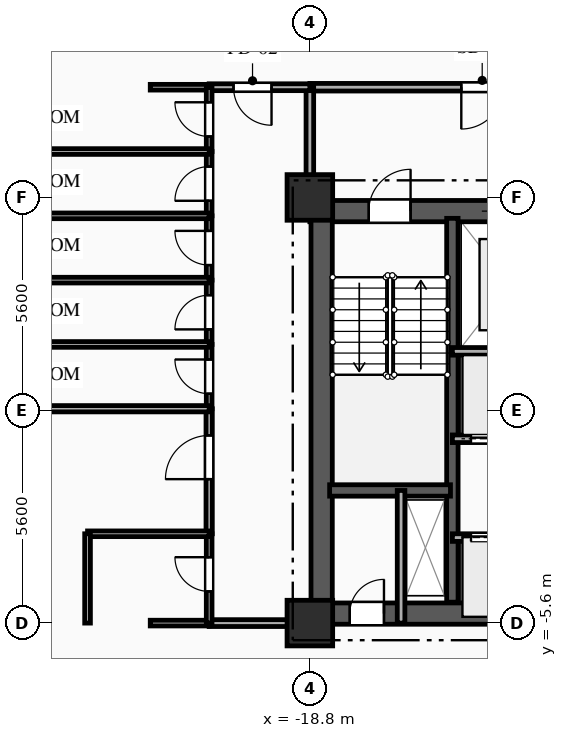
"""IFC4 building model, lengths in metres.
Left out: names, types, materials, properties, quantities, classifications, styles, units other than length and angle.
Written with IfcOpenShell. Run it as: python <this file> out.ifc"""

import sys

from ifc_helpers import new_model, si_unit, direction, frame, frame_2d, origin, origin_2d, place, context, subcontext, project, spatial, rectangle, extrude, element, fill, save


model = new_model("IFC4")
c1 = context("Model", 3, precision=1e-05, world=origin(), true_north=direction((0.0, 1.0)))
c2 = subcontext(c1, "Body", "Model", "MODEL_VIEW")
j1 = project(units=[si_unit("LENGTHUNIT", "METRE"), si_unit("PLANEANGLEUNIT", "RADIAN")], contexts=[c1])
p1 = place(None, origin())
s1 = spatial("IfcSite", under=j1, at=p1, CompositionType="ELEMENT")
p2 = place(p1, origin())
s2 = spatial("IfcBuilding", under=s1, at=p2, CompositionType="ELEMENT")
p3 = place(p2, frame((0.0, 0.0, 53.8)))
s3 = spatial("IfcBuildingStorey", under=s2, at=p3, CompositionType="ELEMENT", Elevation=53.8)
for number, where, z_axis, x_axis in (
    (1, (-18.8, -5.6, 0.0), (0.0, 0.0, 1.0), (1.0, 0.0, 0.0)),
    (2, (-18.8, 5.6, 0.0), (0.0, 0.0, 1.0), (1.0, 0.0, 0.0)),
):
    element("IfcColumn", number, at=place(p3, frame(where, z_axis=z_axis, x_axis=x_axis)), inside=s3, PredefinedType="COLUMN", context=c2, shape_type="SweptSolid", body=[
        extrude(rectangle(XDim=1.2, YDim=1.2, at=origin_2d()), origin(), (0.0, 0.0, 1.0), 3.35),
    ])
p4 = place(p3, frame((-18.8, 5.24, 0.0), z_axis=(0.0, 0.0, 1.0), x_axis=(1.0, 0.0, 0.0)))
e3 = element("IfcWall", 3, at=p4, inside=s3, PredefinedType="SHEAR", context=c2, shape_type="SweptSolid", body=[
    extrude(rectangle(XDim=9.6, YDim=0.56, at=frame_2d((4.8, 0.0))), origin(), (0.0, 0.0, 1.0), 3.035),
])
p5 = place(p4, frame((1.55, 0.0, 0.0)))
e4 = element("IfcOpeningElement", 4, at=p5, cuts=e3, PredefinedType="OPENING", context=c2, shape_type="SweptSolid", body=[
    extrude(rectangle(XDim=1.1, YDim=2.15, at=frame_2d((0.55, 1.075))), frame((0.0, 0.29, 0.0), z_axis=(0.0, -1.0, 0.0), x_axis=(1.0, 0.0, 0.0)), (0.0, 0.0, 1.0), 0.58),
])
p6 = place(p4, frame((4.775, 0.0, 0.0)))
e5 = element("IfcOpeningElement", 5, at=p6, cuts=e3, PredefinedType="OPENING", context=c2, shape_type="SweptSolid", body=[
    extrude(rectangle(XDim=1.05, YDim=2.1, at=frame_2d((0.525, 1.05))), frame((0.0, 0.29, 0.0), z_axis=(0.0, -1.0, 0.0), x_axis=(1.0, 0.0, 0.0)), (0.0, 0.0, 1.0), 0.58),
])
p7 = place(p3, frame((-18.8, -5.35, 0.0), z_axis=(0.0, 0.0, 1.0), x_axis=(1.0, 0.0, 0.0)))
e6 = element("IfcWall", 6, at=p7, inside=s3, PredefinedType="SHEAR", context=c2, shape_type="SweptSolid", body=[
    extrude(rectangle(XDim=9.6, YDim=0.56, at=frame_2d((4.8, 0.0))), origin(), (0.0, 0.0, 1.0), 3.035),
])
p8 = place(p7, frame((1.05, 0.0, 0.0)))
e7 = element("IfcOpeningElement", 7, at=p8, cuts=e6, PredefinedType="OPENING", context=c2, shape_type="SweptSolid", body=[
    extrude(rectangle(XDim=0.9, YDim=2.1, at=frame_2d((0.45, 1.05))), frame((0.0, 0.29, 0.0), z_axis=(0.0, -1.0, 0.0), x_axis=(1.0, 0.0, 0.0)), (0.0, 0.0, 1.0), 0.58),
])
p9 = place(p3, frame((-18.49, -5.05, 0.0), z_axis=(0.0, 0.0, 1.0), x_axis=(0.0, 1.0, 0.0)))
e8 = element("IfcWall", 8, at=p9, inside=s3, PredefinedType="SHEAR", context=c2, shape_type="SweptSolid", body=[
    extrude(rectangle(XDim=10.1, YDim=0.56, at=frame_2d((5.05, 0.0))), origin(), (0.0, 0.0, 1.0), 3.035),
])
p10 = place(p3, frame((-15.05, -5.05, 0.0), z_axis=(0.0, 0.0, 1.0), x_axis=(0.0, 1.0, 0.0)))
e9 = element("IfcWall", 9, at=p10, inside=s3, PredefinedType="SHEAR", context=c2, shape_type="SweptSolid", body=[
    extrude(rectangle(XDim=10.1, YDim=0.3, at=frame_2d((5.05, 0.0))), origin(), (0.0, 0.0, 1.0), 3.035),
])
p11 = place(p3, frame((-18.28, -2.11, 0.0), z_axis=(0.0, 0.0, 1.0), x_axis=(1.0, 0.0, 0.0)))
e10 = element("IfcWall", 10, at=p11, inside=s3, PredefinedType="SHEAR", context=c2, shape_type="SweptSolid", body=[
    extrude(rectangle(XDim=3.18, YDim=0.3, at=frame_2d((1.59, 0.0))), origin(), (0.0, 0.0, 1.0), 3.035),
])
p12 = place(p3, frame((-16.4, -5.6, 0.0), z_axis=(0.0, 0.0, 1.0), x_axis=(0.0, 1.0, 0.0)))
e11 = element("IfcWall", 11, at=p12, inside=s3, PredefinedType="PARTITIONING", context=c2, shape_type="SweptSolid", body=[
    extrude(rectangle(XDim=3.49, YDim=0.2, at=frame_2d((1.745, 0.0))), origin(), (0.0, 0.0, 1.0), 3.035),
])
p13 = place(p3, frame((-12.0, 8.5, 0.0), z_axis=(0.0, 0.0, 1.0), x_axis=(-1.0, 0.0, 0.0)))
e12 = element("IfcWall", 12, at=p13, inside=s3, PredefinedType="PARTITIONING", context=c2, shape_type="SweptSolid", body=[
    extrude(rectangle(XDim=6.8, YDim=0.2, at=frame_2d((3.4, 0.0))), origin(), (0.0, 0.0, 1.0), 3.035),
])
p14 = place(p13, frame((1.715, 0.0, 0.0)))
e13 = element("IfcOpeningElement", 13, at=p14, cuts=e12, PredefinedType="OPENING", context=c2, shape_type="SweptSolid", body=[
    extrude(rectangle(XDim=1.1, YDim=2.15, at=frame_2d((0.55, 1.075))), frame((0.0, 0.11, 0.0), z_axis=(0.0, -1.0, 0.0), x_axis=(1.0, 0.0, 0.0)), (0.0, 0.0, 1.0), 0.22),
])
p15 = place(p3, frame((-18.8, 8.5, 0.0), z_axis=(0.0, 0.0, 1.0), x_axis=(0.0, -1.0, 0.0)))
e14 = element("IfcWall", 14, at=p15, inside=s3, PredefinedType="PARTITIONING", context=c2, shape_type="SweptSolid", body=[
    extrude(rectangle(XDim=2.9, YDim=0.2, at=frame_2d((1.45, 0.0))), origin(), (0.0, 0.0, 1.0), 2.52),
])
p16 = place(p3, frame((-15.05, -3.35, 0.0), z_axis=(0.0, 0.0, 1.0), x_axis=(1.0, 0.0, 0.0)))
e15 = element("IfcWall", 15, at=p16, inside=s3, PredefinedType="PARTITIONING", context=c2, shape_type="SweptSolid", body=[
    extrude(rectangle(XDim=2.03, YDim=0.2, at=frame_2d((1.015, 0.0))), origin(), (0.0, 0.0, 1.0), 3.035),
])
p17 = place(p16, frame((0.49, 0.0, 0.0)))
e16 = element("IfcOpeningElement", 16, at=p17, cuts=e15, PredefinedType="OPENING", context=c2, shape_type="SweptSolid", body=[
    extrude(rectangle(XDim=1.05, YDim=2.1, at=frame_2d((0.525, 1.05))), frame((0.0, 0.11, 0.0), z_axis=(0.0, -1.0, 0.0), x_axis=(1.0, 0.0, 0.0)), (0.0, 0.0, 1.0), 0.22),
])
p18 = place(p3, frame((-13.02, -0.75, 0.0), z_axis=(0.0, 0.0, 1.0), x_axis=(-1.0, 0.0, 0.0)))
e17 = element("IfcWall", 17, at=p18, inside=s3, PredefinedType="PARTITIONING", context=c2, shape_type="SweptSolid", body=[
    extrude(rectangle(XDim=2.03, YDim=0.2, at=frame_2d((1.015, 0.0))), origin(), (0.0, 0.0, 1.0), 3.035),
])
p19 = place(p18, frame((0.49, 0.0, 0.0)))
e18 = element("IfcOpeningElement", 18, at=p19, cuts=e17, PredefinedType="OPENING", context=c2, shape_type="SweptSolid", body=[
    extrude(rectangle(XDim=1.05, YDim=2.1, at=frame_2d((0.525, 1.05))), frame((0.0, 0.11, 0.0), z_axis=(0.0, -1.0, 0.0), x_axis=(1.0, 0.0, 0.0)), (0.0, 0.0, 1.0), 0.22),
])
p20 = place(p3, frame((-18.8, 8.5, 0.0), z_axis=(0.0, 0.0, 1.0), x_axis=(-1.0, 0.0, 0.0)))
e19 = element("IfcWall", 19, at=p20, inside=s3, PredefinedType="PARTITIONING", context=c2, shape_type="SweptSolid", body=[
    extrude(rectangle(XDim=2.65, YDim=0.18, at=frame_2d((1.325, 0.0))), origin(), (0.0, 0.0, 1.0), 3.035),
])
p21 = place(p20, frame((1.009, 0.0, 0.0)))
e20 = element("IfcOpeningElement", 20, at=p21, cuts=e19, PredefinedType="OPENING", context=c2, shape_type="SweptSolid", body=[
    extrude(rectangle(XDim=1.0, YDim=2.15, at=frame_2d((0.5, 1.075))), frame((0.0, 0.1, 0.0), z_axis=(0.0, -1.0, 0.0), x_axis=(1.0, 0.0, 0.0)), (0.0, 0.0, 1.0), 0.2),
])
p22 = place(p3, frame((-21.45, 8.5, 0.0), z_axis=(0.0, 0.0, 1.0), x_axis=(-1.0, 0.0, 0.0)))
e21 = element("IfcWall", 21, at=p22, inside=s3, PredefinedType="PARTITIONING", context=c2, shape_type="SweptSolid", body=[
    extrude(rectangle(XDim=1.55, YDim=0.15, at=frame_2d((0.775, 0.0))), origin(), (0.0, 0.0, 1.0), 3.035),
])
p23 = place(p3, frame((-21.45, -5.6, 0.0), z_axis=(0.0, 0.0, 1.0), x_axis=(1.0, 0.0, 0.0)))
e22 = element("IfcWall", 22, at=p23, inside=s3, PredefinedType="PARTITIONING", context=c2, shape_type="SweptSolid", body=[
    extrude(rectangle(XDim=2.65, YDim=0.18, at=frame_2d((1.325, 0.0))), origin(), (0.0, 0.0, 1.0), 3.035),
])
p24 = place(p3, frame((-23.0, -5.6, 0.0), z_axis=(0.0, 0.0, 1.0), x_axis=(1.0, 0.0, 0.0)))
e23 = element("IfcWall", 23, at=p24, inside=s3, PredefinedType="PLUMBINGWALL", context=c2, shape_type="SweptSolid", body=[
    extrude(rectangle(XDim=1.55, YDim=0.15, at=frame_2d((0.775, 0.0))), origin(), (0.0, 0.0, 1.0), 3.035),
])
p25 = place(p3, frame((-21.45, -5.6, 0.0), z_axis=(0.0, 0.0, 1.0), x_axis=(0.0, 1.0, 0.0)))
e24 = element("IfcWall", 24, at=p25, inside=s3, PredefinedType="PLUMBINGWALL", context=c2, shape_type="SweptSolid", body=[
    extrude(rectangle(XDim=2.35, YDim=0.15, at=frame_2d((1.175, 0.0))), origin(), (0.0, 0.0, 1.0), 3.035),
])
p26 = place(p25, frame((0.834, 0.0, 0.0)))
e25 = element("IfcOpeningElement", 25, at=p26, cuts=e24, PredefinedType="OPENING", context=c2, shape_type="SweptSolid", body=[
    extrude(rectangle(XDim=0.9, YDim=2.1, at=frame_2d((0.45, 1.05))), frame((0.0, 0.085, 0.0), z_axis=(0.0, -1.0, 0.0), x_axis=(1.0, 0.0, 0.0)), (0.0, 0.0, 1.0), 0.17),
])
p27 = place(p3, frame((-21.45, -3.25, 0.0), z_axis=(0.0, 0.0, 1.0), x_axis=(0.0, 1.0, 0.0)))
e26 = element("IfcWall", 26, at=p27, inside=s3, PredefinedType="PARTITIONING", context=c2, shape_type="SweptSolid", body=[
    extrude(rectangle(XDim=3.29, YDim=0.165, at=frame_2d((1.645, 0.0))), origin(), (0.0, 0.0, 1.0), 3.035),
])
p28 = place(p27, frame((1.438, 0.0, 0.0)))
e27 = element("IfcOpeningElement", 27, at=p28, cuts=e26, PredefinedType="OPENING", context=c2, shape_type="SweptSolid", body=[
    extrude(rectangle(XDim=1.15, YDim=2.15, at=frame_2d((0.575, 1.075))), frame((0.0, 0.093, 0.0), z_axis=(0.0, -1.0, 0.0), x_axis=(1.0, 0.0, 0.0)), (0.0, 0.0, 1.0), 0.185),
])
p29 = place(p3, frame((-21.45, 0.04, 0.0), z_axis=(0.0, 0.0, 1.0), x_axis=(0.0, 1.0, 0.0)))
e28 = element("IfcWall", 28, at=p29, inside=s3, PredefinedType="PARTITIONING", context=c2, shape_type="SweptSolid", body=[
    extrude(rectangle(XDim=1.692, YDim=0.15, at=frame_2d((0.846, 0.0))), origin(), (0.0, 0.0, 1.0), 3.035),
])
p30 = place(p29, frame((0.396, 0.0, 0.0)))
e29 = element("IfcOpeningElement", 29, at=p30, cuts=e28, PredefinedType="OPENING", context=c2, shape_type="SweptSolid", body=[
    extrude(rectangle(XDim=0.9, YDim=2.1, at=frame_2d((0.45, 1.05))), frame((0.0, 0.085, 0.0), z_axis=(0.0, -1.0, 0.0), x_axis=(1.0, 0.0, 0.0)), (0.0, 0.0, 1.0), 0.17),
])
p31 = place(p3, frame((-21.45, 1.732, 0.0), z_axis=(0.0, 0.0, 1.0), x_axis=(0.0, 1.0, 0.0)))
e30 = element("IfcWall", 30, at=p31, inside=s3, PredefinedType="PARTITIONING", context=c2, shape_type="SweptSolid", body=[
    extrude(rectangle(XDim=1.692, YDim=0.15, at=frame_2d((0.846, 0.0))), origin(), (0.0, 0.0, 1.0), 3.035),
])
p32 = place(p31, frame((0.396, 0.0, 0.0)))
e31 = element("IfcOpeningElement", 31, at=p32, cuts=e30, PredefinedType="OPENING", context=c2, shape_type="SweptSolid", body=[
    extrude(rectangle(XDim=0.9, YDim=2.1, at=frame_2d((0.45, 1.05))), frame((0.0, 0.085, 0.0), z_axis=(0.0, -1.0, 0.0), x_axis=(1.0, 0.0, 0.0)), (0.0, 0.0, 1.0), 0.17),
])
p33 = place(p3, frame((-21.45, 3.424, 0.0), z_axis=(0.0, 0.0, 1.0), x_axis=(0.0, 1.0, 0.0)))
e32 = element("IfcWall", 32, at=p33, inside=s3, PredefinedType="PARTITIONING", context=c2, shape_type="SweptSolid", body=[
    extrude(rectangle(XDim=1.692, YDim=0.15, at=frame_2d((0.846, 0.0))), origin(), (0.0, 0.0, 1.0), 3.035),
])
p34 = place(p33, frame((0.396, 0.0, 0.0)))
e33 = element("IfcOpeningElement", 33, at=p34, cuts=e32, PredefinedType="OPENING", context=c2, shape_type="SweptSolid", body=[
    extrude(rectangle(XDim=0.9, YDim=2.1, at=frame_2d((0.45, 1.05))), frame((0.0, 0.085, 0.0), z_axis=(0.0, -1.0, 0.0), x_axis=(1.0, 0.0, 0.0)), (0.0, 0.0, 1.0), 0.17),
])
p35 = place(p3, frame((-21.45, 5.116, 0.0), z_axis=(0.0, 0.0, 1.0), x_axis=(0.0, 1.0, 0.0)))
e34 = element("IfcWall", 34, at=p35, inside=s3, PredefinedType="PARTITIONING", context=c2, shape_type="SweptSolid", body=[
    extrude(rectangle(XDim=1.692, YDim=0.15, at=frame_2d((0.846, 0.0))), origin(), (0.0, 0.0, 1.0), 3.035),
])
p36 = place(p35, frame((0.396, 0.0, 0.0)))
e35 = element("IfcOpeningElement", 35, at=p36, cuts=e34, PredefinedType="OPENING", context=c2, shape_type="SweptSolid", body=[
    extrude(rectangle(XDim=0.9, YDim=2.1, at=frame_2d((0.45, 1.05))), frame((0.0, 0.085, 0.0), z_axis=(0.0, -1.0, 0.0), x_axis=(1.0, 0.0, 0.0)), (0.0, 0.0, 1.0), 0.17),
])
p37 = place(p3, frame((-21.45, 6.808, 0.0), z_axis=(0.0, 0.0, 1.0), x_axis=(0.0, 1.0, 0.0)))
e36 = element("IfcWall", 36, at=p37, inside=s3, PredefinedType="PARTITIONING", context=c2, shape_type="SweptSolid", body=[
    extrude(rectangle(XDim=1.692, YDim=0.15, at=frame_2d((0.846, 0.0))), origin(), (0.0, 0.0, 1.0), 3.035),
])
p38 = place(p37, frame((0.396, 0.0, 0.0)))
e37 = element("IfcOpeningElement", 37, at=p38, cuts=e36, PredefinedType="OPENING", context=c2, shape_type="SweptSolid", body=[
    extrude(rectangle(XDim=0.9, YDim=2.1, at=frame_2d((0.45, 1.05))), frame((0.0, 0.085, 0.0), z_axis=(0.0, -1.0, 0.0), x_axis=(1.0, 0.0, 0.0)), (0.0, 0.0, 1.0), 0.17),
])
p39 = place(p3, frame((-24.65, -3.25, 0.0), z_axis=(0.0, 0.0, 1.0), x_axis=(1.0, 0.0, 0.0)))
e38 = element("IfcWall", 38, at=p39, inside=s3, PredefinedType="PLUMBINGWALL", context=c2, shape_type="SweptSolid", body=[
    extrude(rectangle(XDim=3.2, YDim=0.15, at=frame_2d((1.6, 0.0))), origin(), (0.0, 0.0, 1.0), 2.52),
])
p40 = place(p3, frame((-24.65, -5.6, 0.0), z_axis=(0.0, 0.0, 1.0), x_axis=(0.0, 1.0, 0.0)))
e39 = element("IfcWall", 39, at=p40, inside=s3, PredefinedType="PLUMBINGWALL", context=c2, shape_type="SweptSolid", body=[
    extrude(rectangle(XDim=2.35, YDim=0.15, at=frame_2d((1.175, 0.0))), origin(), (0.0, 0.0, 1.0), 3.035),
])
p41 = place(p3, frame((-32.8, 0.04, 0.0), z_axis=(0.0, 0.0, 1.0), x_axis=(1.0, 0.0, 0.0)))
e40 = element("IfcWall", 40, at=p41, inside=s3, PredefinedType="PARTITIONING", context=c2, shape_type="SweptSolid", body=[
    extrude(rectangle(XDim=11.35, YDim=0.165, at=frame_2d((5.675, 0.0))), origin(), (0.0, 0.0, 1.0), 3.035),
])
p42 = place(p3, frame((-32.8, 1.732, 0.0), z_axis=(0.0, 0.0, 1.0), x_axis=(1.0, 0.0, 0.0)))
e41 = element("IfcWall", 41, at=p42, inside=s3, PredefinedType="PARTITIONING", context=c2, shape_type="SweptSolid", body=[
    extrude(rectangle(XDim=11.35, YDim=0.15, at=frame_2d((5.675, 0.0))), origin(), (0.0, 0.0, 1.0), 3.035),
])
for number, where, z_axis, x_axis in (
    (42, (-32.8, 3.424, 0.0), (0.0, 0.0, 1.0), (1.0, 0.0, 0.0)),
    (43, (-32.8, 5.116, 0.0), (0.0, 0.0, 1.0), (1.0, 0.0, 0.0)),
):
    element("IfcWall", number, at=place(p3, frame(where, z_axis=z_axis, x_axis=x_axis)), inside=s3, PredefinedType="PARTITIONING", context=c2, shape_type="SweptSolid", body=[
        extrude(rectangle(XDim=11.35, YDim=0.15, at=frame_2d((5.675, 0.0))), origin(), (0.0, 0.0, 1.0), 2.52),
    ])
p43 = place(p3, frame((-32.8, 6.808, 0.0), z_axis=(0.0, 0.0, 1.0), x_axis=(1.0, 0.0, 0.0)))
e44 = element("IfcWall", 44, at=p43, inside=s3, PredefinedType="PARTITIONING", context=c2, shape_type="SweptSolid", body=[
    extrude(rectangle(XDim=11.35, YDim=0.15, at=frame_2d((5.675, 0.0))), origin(), (0.0, 0.0, 1.0), 3.035),
])
p44 = place(p3, frame((-15.05, 1.55, 0.0), z_axis=(0.0, 0.0, 1.0), x_axis=(1.0, 0.0, 0.0)))
e45 = element("IfcWall", 45, at=p44, inside=s3, PredefinedType="PARTITIONING", context=c2, shape_type="SweptSolid", body=[
    extrude(rectangle(XDim=5.85, YDim=0.2, at=frame_2d((2.925, 0.0))), origin(), (0.0, 0.0, 1.0), 3.035),
])
p45 = place(p5, origin())
e46 = element("IfcDoor", 46, at=p45, inside=s3, OperationType="SINGLE_SWING_RIGHT", PredefinedType="DOOR", context=c2, shape_type="SweptSolid", body=[
    extrude(rectangle(XDim=1.1, YDim=2.15, at=frame_2d((0.55, 1.075))), frame((0.0, 0.025, 0.0), z_axis=(0.0, -1.0, 0.0), x_axis=(1.0, 0.0, 0.0)), (0.0, 0.0, 1.0), 0.05),
])
fill(e4, e46)
p46 = place(p8, origin())
e47 = element("IfcDoor", 47, at=p46, inside=s3, OperationType="SINGLE_SWING_RIGHT", PredefinedType="DOOR", context=c2, shape_type="SweptSolid", body=[
    extrude(rectangle(XDim=0.9, YDim=2.1, at=frame_2d((0.45, 1.05))), frame((0.0, 0.025, 0.0), z_axis=(0.0, -1.0, 0.0), x_axis=(1.0, 0.0, 0.0)), (0.0, 0.0, 1.0), 0.05),
])
fill(e7, e47)
p47 = place(p14, origin())
e48 = element("IfcDoor", 48, at=p47, inside=s3, OperationType="SINGLE_SWING_RIGHT", PredefinedType="DOOR", context=c2, shape_type="SweptSolid", body=[
    extrude(rectangle(XDim=1.1, YDim=2.15, at=frame_2d((0.55, 1.075))), frame((0.0, 0.025, 0.0), z_axis=(0.0, -1.0, 0.0), x_axis=(1.0, 0.0, 0.0)), (0.0, 0.0, 1.0), 0.05),
])
fill(e13, e48)
p48 = place(p17, origin())
e49 = element("IfcDoor", 49, at=p48, inside=s3, OperationType="DOUBLE_DOOR_SLIDING", PredefinedType="DOOR", context=c2, shape_type="SweptSolid", body=[
    extrude(rectangle(XDim=1.05, YDim=2.1, at=frame_2d((0.525, 1.05))), frame((0.0, 0.025, 0.0), z_axis=(0.0, -1.0, 0.0), x_axis=(1.0, 0.0, 0.0)), (0.0, 0.0, 1.0), 0.05),
])
fill(e16, e49)
p49 = place(p19, origin())
e50 = element("IfcDoor", 50, at=p49, inside=s3, OperationType="DOUBLE_DOOR_SLIDING", PredefinedType="DOOR", context=c2, shape_type="SweptSolid", body=[
    extrude(rectangle(XDim=1.05, YDim=2.1, at=frame_2d((0.525, 1.05))), frame((0.0, 0.025, 0.0), z_axis=(0.0, -1.0, 0.0), x_axis=(1.0, 0.0, 0.0)), (0.0, 0.0, 1.0), 0.05),
])
fill(e18, e50)
p50 = place(p21, origin())
e51 = element("IfcDoor", 51, at=p50, inside=s3, OperationType="SINGLE_SWING_LEFT", PredefinedType="DOOR", context=c2, shape_type="SweptSolid", body=[
    extrude(rectangle(XDim=1.0, YDim=2.15, at=frame_2d((0.5, 1.075))), frame((0.0, 0.025, 0.0), z_axis=(0.0, -1.0, 0.0), x_axis=(1.0, 0.0, 0.0)), (0.0, 0.0, 1.0), 0.05),
])
fill(e20, e51)
p51 = place(p26, origin())
e52 = element("IfcDoor", 52, at=p51, inside=s3, OperationType="SINGLE_SWING_RIGHT", PredefinedType="DOOR", context=c2, shape_type="SweptSolid", body=[
    extrude(rectangle(XDim=0.9, YDim=2.1, at=frame_2d((0.45, 1.05))), frame((0.0, 0.025, 0.0), z_axis=(0.0, -1.0, 0.0), x_axis=(1.0, 0.0, 0.0)), (0.0, 0.0, 1.0), 0.05),
])
fill(e25, e52)
p52 = place(p28, origin())
e53 = element("IfcDoor", 53, at=p52, inside=s3, OperationType="SINGLE_SWING_LEFT", PredefinedType="DOOR", context=c2, shape_type="SweptSolid", body=[
    extrude(rectangle(XDim=1.15, YDim=2.15, at=frame_2d((0.575, 1.075))), frame((0.0, 0.025, 0.0), z_axis=(0.0, -1.0, 0.0), x_axis=(1.0, 0.0, 0.0)), (0.0, 0.0, 1.0), 0.05),
])
fill(e27, e53)
p53 = place(p30, origin())
e54 = element("IfcDoor", 54, at=p53, inside=s3, OperationType="SINGLE_SWING_RIGHT", PredefinedType="DOOR", context=c2, shape_type="SweptSolid", body=[
    extrude(rectangle(XDim=0.9, YDim=2.1, at=frame_2d((0.45, 1.05))), frame((0.0, 0.025, 0.0), z_axis=(0.0, -1.0, 0.0), x_axis=(1.0, 0.0, 0.0)), (0.0, 0.0, 1.0), 0.05),
])
fill(e29, e54)
p54 = place(p32, origin())
e55 = element("IfcDoor", 55, at=p54, inside=s3, OperationType="SINGLE_SWING_LEFT", PredefinedType="DOOR", context=c2, shape_type="SweptSolid", body=[
    extrude(rectangle(XDim=0.9, YDim=2.1, at=frame_2d((0.45, 1.05))), frame((0.0, 0.025, 0.0), z_axis=(0.0, -1.0, 0.0), x_axis=(1.0, 0.0, 0.0)), (0.0, 0.0, 1.0), 0.05),
])
fill(e31, e55)
p55 = place(p34, origin())
e56 = element("IfcDoor", 56, at=p55, inside=s3, OperationType="SINGLE_SWING_RIGHT", PredefinedType="DOOR", context=c2, shape_type="SweptSolid", body=[
    extrude(rectangle(XDim=0.9, YDim=2.1, at=frame_2d((0.45, 1.05))), frame((0.0, 0.025, 0.0), z_axis=(0.0, -1.0, 0.0), x_axis=(1.0, 0.0, 0.0)), (0.0, 0.0, 1.0), 0.05),
])
fill(e33, e56)
p56 = place(p36, origin())
e57 = element("IfcDoor", 57, at=p56, inside=s3, OperationType="SINGLE_SWING_LEFT", PredefinedType="DOOR", context=c2, shape_type="SweptSolid", body=[
    extrude(rectangle(XDim=0.9, YDim=2.1, at=frame_2d((0.45, 1.05))), frame((0.0, 0.025, 0.0), z_axis=(0.0, -1.0, 0.0), x_axis=(1.0, 0.0, 0.0)), (0.0, 0.0, 1.0), 0.05),
])
fill(e35, e57)
p57 = place(p38, origin())
e58 = element("IfcDoor", 58, at=p57, inside=s3, OperationType="SINGLE_SWING_RIGHT", PredefinedType="DOOR", context=c2, shape_type="SweptSolid", body=[
    extrude(rectangle(XDim=0.9, YDim=2.1, at=frame_2d((0.45, 1.05))), frame((0.0, 0.025, 0.0), z_axis=(0.0, -1.0, 0.0), x_axis=(1.0, 0.0, 0.0)), (0.0, 0.0, 1.0), 0.05),
])
fill(e37, e58)
save(model, sys.argv[1])
